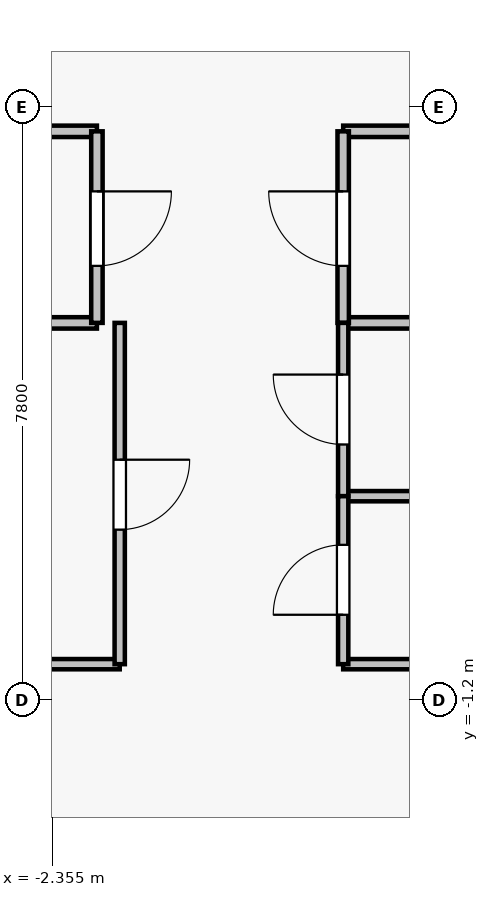
"""IFC4 building model, lengths in metres.
Left out: names, types, materials, properties, quantities, classifications, styles, units other than length and angle.
Written with IfcOpenShell. Run it as: python <this file> out.ifc"""

import sys

from ifc_helpers import new_model, si_unit, direction, frame, frame_2d, origin, place, context, subcontext, project, spatial, rectangle, extrude, source, transform, mapped, element, fill, save


model = new_model("IFC4")
c1 = context("Model", 3, precision=1e-05, world=origin(), true_north=direction((0.0, 1.0)))
c2 = subcontext(c1, "Body", "Model", "MODEL_VIEW")
j1 = project(units=[si_unit("LENGTHUNIT", "METRE"), si_unit("PLANEANGLEUNIT", "RADIAN")], contexts=[c1])
p1 = place(None, origin())
s1 = spatial("IfcSite", under=j1, at=p1, CompositionType="ELEMENT")
p2 = place(p1, origin())
s2 = spatial("IfcBuilding", under=s1, at=p2, CompositionType="ELEMENT")
p3 = place(p2, frame((0.0, 0.0, 268.3)))
s3 = spatial("IfcBuildingStorey", under=s2, at=p3, CompositionType="ELEMENT", Elevation=268.3)
for number, where, z_axis, x_axis in (
    (1, (-1.77, 3.76, 0.0), (0.0, 0.0, 1.0), (-1.0, 0.0, 0.0)),
    (2, (-6.18, 6.28, 0.0), (0.0, 0.0, 1.0), (1.0, 0.0, 0.0)),
):
    element("IfcWall", number, at=place(p3, frame(where, z_axis=z_axis, x_axis=x_axis)), inside=s3, PredefinedType="PARTITIONING", context=c2, shape_type="SweptSolid", body=[
        extrude(rectangle(XDim=4.41, YDim=0.15, at=frame_2d((2.205, 0.0))), origin(), (0.0, 0.0, 1.0), 3.08),
    ])
p4 = place(p3, frame((-1.77, 6.28, 0.0), z_axis=(0.0, 0.0, 1.0), x_axis=(0.0, -1.0, 0.0)))
e3 = element("IfcWall", 3, at=p4, inside=s3, PredefinedType="PARTITIONING", context=c2, shape_type="SweptSolid", body=[
    extrude(rectangle(XDim=2.52, YDim=0.15, at=frame_2d((1.26, 0.0))), origin(), (0.0, 0.0, 1.0), 3.08),
])
p5 = place(p4, frame((0.79, 0.0, 0.0)))
e4 = element("IfcOpeningElement", 4, at=p5, cuts=e3, PredefinedType="OPENING", context=c2, shape_type="SweptSolid", body=[
    extrude(rectangle(XDim=0.98, YDim=2.15, at=frame_2d((0.49, 1.075))), frame((0.0, 0.085, 0.0), z_axis=(0.0, -1.0, 0.0), x_axis=(1.0, 0.0, 0.0)), (0.0, 0.0, 1.0), 0.17),
])
for number, where, z_axis, x_axis in (
    (5, (6.38, 3.76, 0.0), (0.0, 0.0, 1.0), (-1.0, 0.0, 0.0)),
    (6, (1.47, 6.28, 0.0), (0.0, 0.0, 1.0), (1.0, 0.0, 0.0)),
):
    element("IfcWall", number, at=place(p3, frame(where, z_axis=z_axis, x_axis=x_axis)), inside=s3, PredefinedType="PARTITIONING", context=c2, shape_type="SweptSolid", body=[
        extrude(rectangle(XDim=4.91, YDim=0.15, at=frame_2d((2.455, 0.0))), origin(), (0.0, 0.0, 1.0), 3.08),
    ])
p6 = place(p3, frame((1.47, 3.76, 0.0), z_axis=(0.0, 0.0, 1.0), x_axis=(0.0, 1.0, 0.0)))
e7 = element("IfcWall", 7, at=p6, inside=s3, PredefinedType="PARTITIONING", context=c2, shape_type="SweptSolid", body=[
    extrude(rectangle(XDim=2.52, YDim=0.15, at=frame_2d((1.26, 0.0))), origin(), (0.0, 0.0, 1.0), 3.08),
])
p7 = place(p6, frame((0.75, 0.0, 0.0)))
e8 = element("IfcOpeningElement", 8, at=p7, cuts=e7, PredefinedType="OPENING", context=c2, shape_type="SweptSolid", body=[
    extrude(rectangle(XDim=0.98, YDim=2.15, at=frame_2d((0.49, 1.075))), frame((0.0, 0.085, 0.0), z_axis=(0.0, -1.0, 0.0), x_axis=(1.0, 0.0, 0.0)), (0.0, 0.0, 1.0), 0.17),
])
p8 = place(p3, frame((-1.47, -0.73, 0.0), z_axis=(0.0, 0.0, 1.0), x_axis=(-1.0, 0.0, 0.0)))
e9 = element("IfcWall", 9, at=p8, inside=s3, PredefinedType="PARTITIONING", context=c2, shape_type="SweptSolid", body=[
    extrude(rectangle(XDim=5.11, YDim=0.135, at=frame_2d((2.555, 0.0))), origin(), (0.0, 0.0, 1.0), 3.08),
])
p9 = place(p3, frame((-1.47, 3.76, 0.0), z_axis=(0.0, 0.0, 1.0), x_axis=(0.0, -1.0, 0.0)))
e10 = element("IfcWall", 10, at=p9, inside=s3, PredefinedType="PARTITIONING", context=c2, shape_type="SweptSolid", body=[
    extrude(rectangle(XDim=4.49, YDim=0.135, at=frame_2d((2.245, 0.0))), origin(), (0.0, 0.0, 1.0), 3.08),
])
p10 = place(p9, frame((1.8, 0.0, 0.0)))
e11 = element("IfcOpeningElement", 11, at=p10, cuts=e10, PredefinedType="OPENING", context=c2, shape_type="SweptSolid", body=[
    extrude(rectangle(XDim=0.92, YDim=2.1, at=frame_2d((0.46, 1.05))), frame((0.0, 0.077, 0.0), z_axis=(0.0, -1.0, 0.0), x_axis=(1.0, 0.0, 0.0)), (0.0, 0.0, 1.0), 0.155),
])
p11 = place(p3, frame((6.58, 1.48, 0.0), z_axis=(0.0, 0.0, 1.0), x_axis=(-1.0, 0.0, 0.0)))
e12 = element("IfcWall", 12, at=p11, inside=s3, PredefinedType="PARTITIONING", context=c2, shape_type="SweptSolid", body=[
    extrude(rectangle(XDim=5.11, YDim=0.135, at=frame_2d((2.555, 0.0))), origin(), (0.0, 0.0, 1.0), 3.08),
])
p12 = place(p3, frame((1.47, 1.48, 0.0), z_axis=(0.0, 0.0, 1.0), x_axis=(0.0, 1.0, 0.0)))
e13 = element("IfcWall", 13, at=p12, inside=s3, PredefinedType="PARTITIONING", context=c2, shape_type="SweptSolid", body=[
    extrude(rectangle(XDim=2.28, YDim=0.135, at=frame_2d((1.14, 0.0))), origin(), (0.0, 0.0, 1.0), 3.08),
])
p13 = place(p12, frame((0.68, 0.0, 0.0)))
e14 = element("IfcOpeningElement", 14, at=p13, cuts=e13, PredefinedType="OPENING", context=c2, shape_type="SweptSolid", body=[
    extrude(rectangle(XDim=0.92, YDim=2.1, at=frame_2d((0.46, 1.05))), frame((0.0, 0.077, 0.0), z_axis=(0.0, -1.0, 0.0), x_axis=(1.0, 0.0, 0.0)), (0.0, 0.0, 1.0), 0.155),
])
p14 = place(p3, frame((4.18, -0.73, 0.0), z_axis=(0.0, 0.0, 1.0), x_axis=(-1.0, 0.0, 0.0)))
e15 = element("IfcWall", 15, at=p14, inside=s3, PredefinedType="PARTITIONING", context=c2, shape_type="SweptSolid", body=[
    extrude(rectangle(XDim=2.71, YDim=0.135, at=frame_2d((1.355, 0.0))), origin(), (0.0, 0.0, 1.0), 3.08),
])
p15 = place(p3, frame((1.47, -0.73, 0.0), z_axis=(0.0, 0.0, 1.0), x_axis=(0.0, 1.0, 0.0)))
e16 = element("IfcWall", 16, at=p15, inside=s3, PredefinedType="PARTITIONING", context=c2, shape_type="SweptSolid", body=[
    extrude(rectangle(XDim=2.21, YDim=0.135, at=frame_2d((1.105, 0.0))), origin(), (0.0, 0.0, 1.0), 3.08),
])
p16 = place(p15, frame((0.65, 0.0, 0.0)))
e17 = element("IfcOpeningElement", 17, at=p16, cuts=e16, PredefinedType="OPENING", context=c2, shape_type="SweptSolid", body=[
    extrude(rectangle(XDim=0.92, YDim=2.1, at=frame_2d((0.46, 1.05))), frame((0.0, 0.077, 0.0), z_axis=(0.0, -1.0, 0.0), x_axis=(1.0, 0.0, 0.0)), (0.0, 0.0, 1.0), 0.155),
])
m1 = source(origin(), c2, "Body", "SweptSolid", [
    extrude(rectangle(XDim=0.98, YDim=2.15, at=frame_2d((0.49, 1.075))), frame((0.0, 0.025, 0.0), z_axis=(0.0, -1.0, 0.0), x_axis=(1.0, 0.0, 0.0)), (0.0, 0.0, 1.0), 0.05),
])
p17 = place(p5, origin())
e18 = element("IfcDoor", 18, at=p17, inside=s3, OperationType="SINGLE_SWING_LEFT", PredefinedType="DOOR", context=c2, shape_type="MappedRepresentation", body=[
    mapped(m1, transform((0.0, 0.0, 0.0), x_axis=(1.0, 0.0, 0.0), y_axis=(0.0, 1.0, 0.0), z_axis=(0.0, 0.0, 1.0), scale=1.0)),
])
fill(e4, e18)
p18 = place(p7, origin())
e19 = element("IfcDoor", 19, at=p18, inside=s3, OperationType="SINGLE_SWING_RIGHT", PredefinedType="DOOR", context=c2, shape_type="MappedRepresentation", body=[
    mapped(m1, transform((0.0, 0.0, 0.0), x_axis=(1.0, 0.0, 0.0), y_axis=(0.0, 1.0, 0.0), z_axis=(0.0, 0.0, 1.0), scale=1.0)),
])
fill(e8, e19)
m2 = source(origin(), c2, "Body", "SweptSolid", [
    extrude(rectangle(XDim=0.92, YDim=2.1, at=frame_2d((0.46, 1.05))), frame((0.0, 0.025, 0.0), z_axis=(0.0, -1.0, 0.0), x_axis=(1.0, 0.0, 0.0)), (0.0, 0.0, 1.0), 0.05),
])
p19 = place(p10, origin())
e20 = element("IfcDoor", 20, at=p19, inside=s3, OperationType="SINGLE_SWING_LEFT", PredefinedType="DOOR", context=c2, shape_type="MappedRepresentation", body=[
    mapped(m2, transform((0.0, 0.0, 0.0), x_axis=(1.0, 0.0, 0.0), y_axis=(0.0, 1.0, 0.0), z_axis=(0.0, 0.0, 1.0), scale=1.0)),
])
fill(e11, e20)
p20 = place(p13, origin())
e21 = element("IfcDoor", 21, at=p20, inside=s3, OperationType="SINGLE_SWING_RIGHT", PredefinedType="DOOR", context=c2, shape_type="MappedRepresentation", body=[
    mapped(m2, transform((0.0, 0.0, 0.0), x_axis=(1.0, 0.0, 0.0), y_axis=(0.0, 1.0, 0.0), z_axis=(0.0, 0.0, 1.0), scale=1.0)),
])
fill(e14, e21)
p21 = place(p16, origin())
e22 = element("IfcDoor", 22, at=p21, inside=s3, OperationType="SINGLE_SWING_LEFT", PredefinedType="DOOR", context=c2, shape_type="MappedRepresentation", body=[
    mapped(m2, transform((0.0, 0.0, 0.0), x_axis=(1.0, 0.0, 0.0), y_axis=(0.0, 1.0, 0.0), z_axis=(0.0, 0.0, 1.0), scale=1.0)),
])
fill(e17, e22)
save(model, sys.argv[1])
